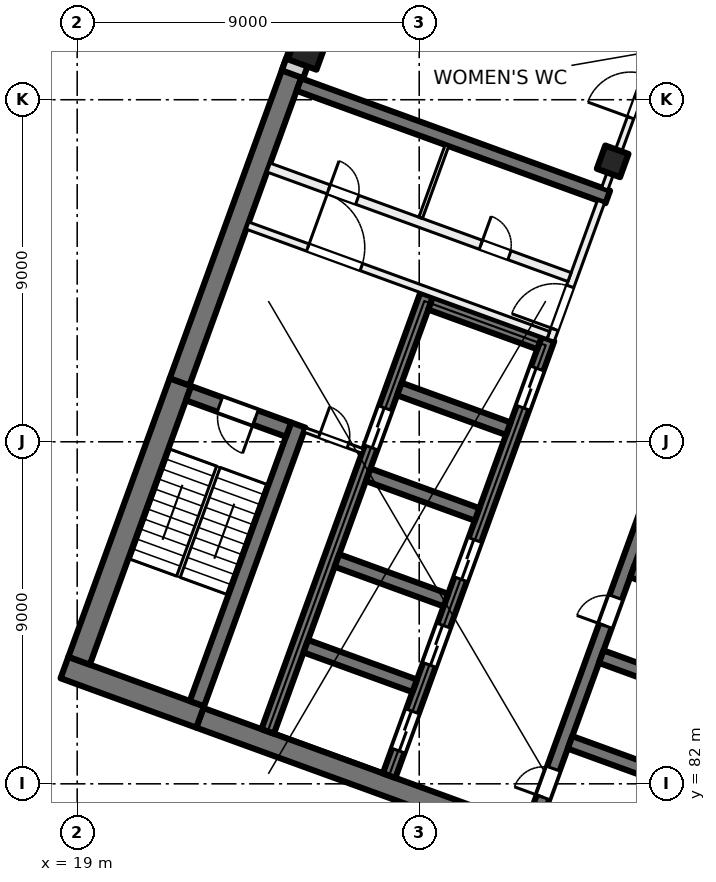
"""IFC4 building model, lengths in metres.
Left out: names, types, materials, properties, quantities, classifications, styles, units other than length and angle.
Written with IfcOpenShell. Run it as: python <this file> out.ifc"""

import sys

from ifc_helpers import new_model, si_unit, direction, frame, frame_2d, origin, origin_2d, place, context, subcontext, project, spatial, rectangle, extrude, element, fill, save


model = new_model("IFC4")
c1 = context("Model", 3, precision=1e-05, world=origin(), true_north=direction((0.0, 1.0)))
c2 = subcontext(c1, "Body", "Model", "MODEL_VIEW")
j1 = project(units=[si_unit("LENGTHUNIT", "METRE"), si_unit("PLANEANGLEUNIT", "RADIAN")], contexts=[c1])
p1 = place(None, origin())
s1 = spatial("IfcSite", under=j1, at=p1, CompositionType="ELEMENT")
p2 = place(p1, origin())
s2 = spatial("IfcBuilding", under=s1, at=p2, CompositionType="ELEMENT")
p3 = place(p2, frame((0.0, 0.0, 154.5)))
s3 = spatial("IfcBuildingStorey", under=s2, at=p3, CompositionType="ELEMENT", Elevation=154.5)
p4 = place(p3, frame((33.091, 98.379, 0.0), z_axis=(0.0, 0.0, 1.0), x_axis=(-0.342020143326, -0.939692620786, 0.0)))
e1 = element("IfcColumn", 1, at=p4, inside=s3, PredefinedType="COLUMN", context=c2, shape_type="SweptSolid", body=[
    extrude(rectangle(XDim=0.65, YDim=0.65, at=origin_2d()), origin(), (0.0, 0.0, 1.0), 4.0),
])
p5 = place(p3, frame((25.056, 101.303, 0.0), z_axis=(0.0, 0.0, 1.0), x_axis=(-0.342020143326, -0.939692620786, 0.0)))
e2 = element("IfcColumn", 2, at=p5, inside=s3, PredefinedType="COLUMN", context=c2, shape_type="SweptSolid", body=[
    extrude(rectangle(XDim=0.8, YDim=0.8, at=origin_2d()), origin(), (0.0, 0.0, 1.0), 4.0),
])
p6 = place(p3, frame((35.759, 78.811, 0.0), z_axis=(0.0, 0.0, 1.0), x_axis=(-0.939692894512, 0.342019391267, 0.0)))
e3 = element("IfcWall", 3, at=p6, inside=s3, PredefinedType="SHEAR", context=c2, shape_type="SweptSolid", body=[
    extrude(rectangle(XDim=14.4, YDim=0.55, at=frame_2d((7.2, 0.0))), origin(), (0.0, 0.0, 1.0), 4.0),
])
p7 = place(p3, frame((22.236, 83.76, 0.0), z_axis=(0.0, 0.0, 1.0), x_axis=(-0.939680822529, 0.342052557032, 0.0)))
e4 = element("IfcWall", 4, at=p7, inside=s3, PredefinedType="SHEAR", context=c2, shape_type="SweptSolid", body=[
    extrude(rectangle(XDim=3.8, YDim=0.6, at=frame_2d((1.9, 0.0))), origin(), (0.0, 0.0, 1.0), 4.0),
])
p8 = place(p3, frame((19.05, 85.239, 0.0), z_axis=(0.0, 0.0, 1.0), x_axis=(0.342016982193, 0.939693771338, 0.0)))
e5 = element("IfcWall", 5, at=p8, inside=s3, PredefinedType="SHEAR", context=c2, shape_type="SweptSolid", body=[
    extrude(rectangle(XDim=7.8, YDim=0.6, at=frame_2d((3.9, 0.0))), origin(), (0.0, 0.0, 1.0), 4.0),
])
p9 = place(p3, frame((21.694, 92.577, 0.0), z_axis=(0.0, 0.0, 1.0), x_axis=(0.342010253184, 0.939696220444, 0.0)))
e6 = element("IfcWall", 6, at=p9, inside=s3, PredefinedType="SHEAR", context=c2, shape_type="SweptSolid", body=[
    extrude(rectangle(XDim=8.95, YDim=0.55, at=frame_2d((4.475, 0.0))), origin(), (0.0, 0.0, 1.0), 4.0),
])
p10 = place(p3, frame((22.15, 84.11, 0.0), z_axis=(0.0, 0.0, 1.0), x_axis=(0.342016982193, 0.939693771338, 0.0)))
e7 = element("IfcWall", 7, at=p10, inside=s3, PredefinedType="SHEAR", context=c2, shape_type="SweptSolid", body=[
    extrude(rectangle(XDim=7.8, YDim=0.4, at=frame_2d((3.9, 0.0))), origin(), (0.0, 0.0, 1.0), 4.0),
])
p11 = place(p3, frame((24.562, 91.32, 0.0), z_axis=(0.0, 0.0, 1.0), x_axis=(-0.939717030584, 0.341953070509, 0.0)))
e8 = element("IfcWall", 8, at=p11, inside=s3, PredefinedType="SHEAR", context=c2, shape_type="SweptSolid", body=[
    extrude(rectangle(XDim=2.8, YDim=0.4, at=frame_2d((1.4, 0.0))), origin(), (0.0, 0.0, 1.0), 4.0),
])
p12 = place(p11, frame((0.925, 0.0, 0.0)))
e9 = element("IfcOpeningElement", 9, at=p12, cuts=e8, PredefinedType="OPENING", context=c2, shape_type="SweptSolid", body=[
    extrude(rectangle(XDim=1.0, YDim=2.1, at=frame_2d((0.5, 1.05))), frame((0.0, 0.21, 0.0), z_axis=(0.0, -1.0, 0.0), x_axis=(1.0, 0.0, 0.0)), (0.0, 0.0, 1.0), 0.42),
])
p13 = place(p3, frame((30.967, 80.848, 0.0), z_axis=(0.0, 0.0, 1.0), x_axis=(0.34201563943, 0.939694260058, 0.0)))
e10 = element("IfcWall", 10, at=p13, inside=s3, PredefinedType="SHEAR", context=c2, shape_type="SweptSolid", body=[
    extrude(rectangle(XDim=12.225, YDim=0.35, at=frame_2d((6.113, 0.0))), origin(), (0.0, 0.0, 1.0), 4.0),
])
p14 = place(p13, frame((0.85, 0.0, 0.0)))
e11 = element("IfcOpeningElement", 11, at=p14, cuts=e10, PredefinedType="OPENING", context=c2, shape_type="SweptSolid", body=[
    extrude(rectangle(XDim=0.8, YDim=2.1, at=frame_2d((0.4, 1.05))), frame((0.0, 0.185, 0.0), z_axis=(0.0, -1.0, 0.0), x_axis=(1.0, 0.0, 0.0)), (0.0, 0.0, 1.0), 0.37),
])
p15 = place(p13, frame((5.65, 0.0, 0.0)))
e12 = element("IfcOpeningElement", 12, at=p15, cuts=e10, PredefinedType="OPENING", context=c2, shape_type="SweptSolid", body=[
    extrude(rectangle(XDim=0.8, YDim=2.1, at=frame_2d((0.4, 1.05))), frame((0.0, 0.185, 0.0), z_axis=(0.0, -1.0, 0.0), x_axis=(1.0, 0.0, 0.0)), (0.0, 0.0, 1.0), 0.37),
])
p16 = place(p3, frame((34.835, 82.047, 0.0), z_axis=(0.0, 0.0, 1.0), x_axis=(-0.939683528043, 0.3420451244, 0.0)))
e13 = element("IfcWall", 13, at=p16, inside=s3, PredefinedType="SHEAR", context=c2, shape_type="SweptSolid", body=[
    extrude(rectangle(XDim=3.05, YDim=0.35, at=frame_2d((1.525, 0.0))), origin(), (0.0, 0.0, 1.0), 4.0),
])
p17 = place(p3, frame((35.656, 84.303, 0.0), z_axis=(0.0, 0.0, 1.0), x_axis=(-0.939709254651, 0.341974438698, 0.0)))
e14 = element("IfcWall", 14, at=p17, inside=s3, PredefinedType="SHEAR", context=c2, shape_type="SweptSolid", body=[
    extrude(rectangle(XDim=3.05, YDim=0.35, at=frame_2d((1.525, 0.0))), origin(), (0.0, 0.0, 1.0), 4.0),
])
p18 = place(p3, frame((36.477, 86.558, 0.0), z_axis=(0.0, 0.0, 1.0), x_axis=(-0.939683528043, 0.3420451244, 0.0)))
e15 = element("IfcWall", 15, at=p18, inside=s3, PredefinedType="SHEAR", context=c2, shape_type="SweptSolid", body=[
    extrude(rectangle(XDim=3.05, YDim=0.35, at=frame_2d((1.525, 0.0))), origin(), (0.0, 0.0, 1.0), 4.0),
])
p19 = place(p3, frame((27.208, 82.216, 0.0), z_axis=(0.0, 0.0, 1.0), x_axis=(0.34201563943, 0.939694260058, 0.0)))
e16 = element("IfcWall", 16, at=p19, inside=s3, PredefinedType="SHEAR", context=c2, shape_type="SweptSolid", body=[
    extrude(rectangle(XDim=12.225, YDim=0.35, at=frame_2d((6.113, 0.0))), origin(), (0.0, 0.0, 1.0), 4.0),
])
p20 = place(p19, frame((0.7, 0.0, 0.0)))
e17 = element("IfcOpeningElement", 17, at=p20, cuts=e16, PredefinedType="OPENING", context=c2, shape_type="SweptSolid", body=[
    extrude(rectangle(XDim=1.1, YDim=2.1, at=frame_2d((0.55, 1.05))), frame((0.0, 0.185, 0.0), z_axis=(0.0, -1.0, 0.0), x_axis=(1.0, 0.0, 0.0)), (0.0, 0.0, 1.0), 0.37),
])
p21 = place(p19, frame((3.1, 0.0, 0.0)))
e18 = element("IfcOpeningElement", 18, at=p21, cuts=e16, PredefinedType="OPENING", context=c2, shape_type="SweptSolid", body=[
    extrude(rectangle(XDim=1.1, YDim=2.1, at=frame_2d((0.55, 1.05))), frame((0.0, 0.185, 0.0), z_axis=(0.0, -1.0, 0.0), x_axis=(1.0, 0.0, 0.0)), (0.0, 0.0, 1.0), 0.37),
])
p22 = place(p19, frame((5.5, 0.0, 0.0)))
e19 = element("IfcOpeningElement", 19, at=p22, cuts=e16, PredefinedType="OPENING", context=c2, shape_type="SweptSolid", body=[
    extrude(rectangle(XDim=1.1, YDim=2.1, at=frame_2d((0.55, 1.05))), frame((0.0, 0.185, 0.0), z_axis=(0.0, -1.0, 0.0), x_axis=(1.0, 0.0, 0.0)), (0.0, 0.0, 1.0), 0.37),
])
p23 = place(p19, frame((10.3, 0.0, 0.0)))
e20 = element("IfcOpeningElement", 20, at=p23, cuts=e16, PredefinedType="OPENING", context=c2, shape_type="SweptSolid", body=[
    extrude(rectangle(XDim=1.1, YDim=2.1, at=frame_2d((0.55, 1.05))), frame((0.0, 0.185, 0.0), z_axis=(0.0, -1.0, 0.0), x_axis=(1.0, 0.0, 0.0)), (0.0, 0.0, 1.0), 0.37),
])
p24 = place(p3, frame((24.013, 83.379, 0.0), z_axis=(0.0, 0.0, 1.0), x_axis=(0.34201563943, 0.939694260058, 0.0)))
e21 = element("IfcWall", 21, at=p24, inside=s3, PredefinedType="SHEAR", context=c2, shape_type="SweptSolid", body=[
    extrude(rectangle(XDim=12.225, YDim=0.35, at=frame_2d((6.113, 0.0))), origin(), (0.0, 0.0, 1.0), 4.0),
])
p25 = place(p24, frame((7.95, 0.0, 0.0)))
e22 = element("IfcOpeningElement", 22, at=p25, cuts=e21, PredefinedType="OPENING", context=c2, shape_type="SweptSolid", body=[
    extrude(rectangle(XDim=1.1, YDim=2.1, at=frame_2d((0.55, 1.05))), frame((0.0, 0.185, 0.0), z_axis=(0.0, -1.0, 0.0), x_axis=(1.0, 0.0, 0.0)), (0.0, 0.0, 1.0), 0.37),
])
for number, where, z_axis, x_axis in (
    (23, (27.881, 84.578, 0.0), (0.0, 0.0, 1.0), (-0.94, 0.342, 0.0)),
    (24, (28.702, 86.833, 0.0), (0.0, 0.0, 1.0), (-0.94, 0.342, 0.0)),
    (25, (29.523, 89.089, 0.0), (0.0, 0.0, 1.0), (-0.94, 0.342, 0.0)),
):
    element("IfcWall", number, at=place(p3, frame(where, z_axis=z_axis, x_axis=x_axis)), inside=s3, PredefinedType="SHEAR", context=c2, shape_type="SweptSolid", body=[
        extrude(rectangle(XDim=3.05, YDim=0.35, at=frame_2d((1.525, 0.0))), origin(), (0.0, 0.0, 1.0), 4.0),
    ])
p26 = place(p3, frame((30.344, 91.344, 0.0), z_axis=(0.0, 0.0, 1.0), x_axis=(-0.939709254651, 0.341974438698, 0.0)))
e26 = element("IfcWall", 26, at=p26, inside=s3, PredefinedType="SHEAR", context=c2, shape_type="SweptSolid", body=[
    extrude(rectangle(XDim=3.05, YDim=0.35, at=frame_2d((1.525, 0.0))), origin(), (0.0, 0.0, 1.0), 4.0),
])
p27 = place(p3, frame((31.165, 93.599, 0.0), z_axis=(0.0, 0.0, 1.0), x_axis=(-0.939683528043, 0.3420451244, 0.0)))
e27 = element("IfcWall", 27, at=p27, inside=s3, PredefinedType="SHEAR", context=c2, shape_type="SweptSolid", body=[
    extrude(rectangle(XDim=3.05, YDim=0.35, at=frame_2d((1.525, 0.0))), origin(), (0.0, 0.0, 1.0), 4.0),
])
p28 = place(p3, frame((32.962, 97.441, 0.0), z_axis=(0.0, 0.0, 1.0), x_axis=(-0.939689545667, 0.342028592028, 0.0)))
e28 = element("IfcWall", 28, at=p28, inside=s3, PredefinedType="SHEAR", context=c2, shape_type="SweptSolid", body=[
    extrude(rectangle(XDim=8.65, YDim=0.35, at=frame_2d((4.325, 0.0))), origin(), (0.0, 0.0, 1.0), 4.0),
])
p29 = place(p3, frame((24.666, 100.669, 0.0), z_axis=(0.0, 0.0, 1.0), x_axis=(0.34201964167, 0.939692803373, 0.0)))
e29 = element("IfcWall", 29, at=p29, inside=s3, PredefinedType="SOLIDWALL", context=c2, shape_type="SweptSolid", body=[
    extrude(rectangle(XDim=32.884, YDim=0.6, at=frame_2d((16.442, 0.0))), origin(), (0.0, 0.0, 1.0), 3.625),
])
p30 = place(p29, frame((1.48, 0.0, 0.9)))
e30 = element("IfcOpeningElement", 30, at=p30, cuts=e29, PredefinedType="OPENING", context=c2, shape_type="SweptSolid", body=[
    extrude(rectangle(XDim=3.0, YDim=2.4, at=frame_2d((1.5, 1.2))), frame((0.0, 0.31, 0.0), z_axis=(0.0, -1.0, 0.0), x_axis=(1.0, 0.0, 0.0)), (0.0, 0.0, 1.0), 0.62),
])
p31 = place(p29, frame((5.98, 0.0, 0.9)))
e31 = element("IfcOpeningElement", 31, at=p31, cuts=e29, PredefinedType="OPENING", context=c2, shape_type="SweptSolid", body=[
    extrude(rectangle(XDim=3.0, YDim=2.4, at=frame_2d((1.5, 1.2))), frame((0.0, 0.31, 0.0), z_axis=(0.0, -1.0, 0.0), x_axis=(1.0, 0.0, 0.0)), (0.0, 0.0, 1.0), 0.62),
])
p32 = place(p29, frame((10.48, 0.0, 0.9)))
e32 = element("IfcOpeningElement", 32, at=p32, cuts=e29, PredefinedType="OPENING", context=c2, shape_type="SweptSolid", body=[
    extrude(rectangle(XDim=3.0, YDim=2.4, at=frame_2d((1.5, 1.2))), frame((0.0, 0.31, 0.0), z_axis=(0.0, -1.0, 0.0), x_axis=(1.0, 0.0, 0.0)), (0.0, 0.0, 1.0), 0.62),
])
p33 = place(p29, frame((14.98, 0.0, 0.9)))
e33 = element("IfcOpeningElement", 33, at=p33, cuts=e29, PredefinedType="OPENING", context=c2, shape_type="SweptSolid", body=[
    extrude(rectangle(XDim=3.0, YDim=2.4, at=frame_2d((1.5, 1.2))), frame((0.0, 0.31, 0.0), z_axis=(0.0, -1.0, 0.0), x_axis=(1.0, 0.0, 0.0)), (0.0, 0.0, 1.0), 0.62),
])
p34 = place(p29, frame((20.08, 0.0, 0.0)))
e34 = element("IfcOpeningElement", 34, at=p34, cuts=e29, PredefinedType="OPENING", context=c2, shape_type="SweptSolid", body=[
    extrude(rectangle(XDim=1.8, YDim=2.4, at=frame_2d((0.9, 1.2))), frame((0.0, 0.31, 0.0), z_axis=(0.0, -1.0, 0.0), x_axis=(1.0, 0.0, 0.0)), (0.0, 0.0, 1.0), 0.62),
])
p35 = place(p29, frame((23.98, 0.0, 0.9)))
e35 = element("IfcOpeningElement", 35, at=p35, cuts=e29, PredefinedType="OPENING", context=c2, shape_type="SweptSolid", body=[
    extrude(rectangle(XDim=3.0, YDim=2.4, at=frame_2d((1.5, 1.2))), frame((0.0, 0.31, 0.0), z_axis=(0.0, -1.0, 0.0), x_axis=(1.0, 0.0, 0.0)), (0.0, 0.0, 1.0), 0.62),
])
p36 = place(p29, frame((28.48, 0.0, 0.9)))
e36 = element("IfcOpeningElement", 36, at=p36, cuts=e29, PredefinedType="OPENING", context=c2, shape_type="SweptSolid", body=[
    extrude(rectangle(XDim=3.0, YDim=2.4, at=frame_2d((1.5, 1.2))), frame((0.0, 0.31, 0.0), z_axis=(0.0, -1.0, 0.0), x_axis=(1.0, 0.0, 0.0)), (0.0, 0.0, 1.0), 0.62),
])
p37 = place(p3, frame((31.459, 93.678, 0.0), z_axis=(0.0, 0.0, 1.0), x_axis=(0.341985870128, 0.939705094502, 0.0)))
e37 = element("IfcWall", 37, at=p37, inside=s3, PredefinedType="PARTITIONING", context=c2, shape_type="SweptSolid", body=[
    extrude(rectangle(XDim=3.875, YDim=0.2, at=frame_2d((1.938, 0.0))), origin(), (0.0, 0.0, 1.0), 3.625),
])
p38 = place(p37, frame((0.3, 0.0, 0.0)))
e38 = element("IfcOpeningElement", 38, at=p38, cuts=e37, PredefinedType="OPENING", context=c2, shape_type="SweptSolid", body=[
    extrude(rectangle(XDim=1.2, YDim=2.1, at=frame_2d((0.6, 1.05))), frame((0.0, 0.11, 0.0), z_axis=(0.0, -1.0, 0.0), x_axis=(1.0, 0.0, 0.0)), (0.0, 0.0, 1.0), 0.22),
])
p39 = place(p3, frame((23.483, 96.688, 0.0), z_axis=(0.0, 0.0, 1.0), x_axis=(0.939691007314, -0.342024576271, 0.0)))
e39 = element("IfcWall", 39, at=p39, inside=s3, PredefinedType="PARTITIONING", context=c2, shape_type="SweptSolid", body=[
    extrude(rectangle(XDim=8.425, YDim=0.2, at=frame_2d((4.212, 0.0))), origin(), (0.0, 0.0, 1.0), 3.625),
])
p40 = place(p39, frame((1.688, 0.0, 0.0)))
e40 = element("IfcOpeningElement", 40, at=p40, cuts=e39, PredefinedType="OPENING", context=c2, shape_type="SweptSolid", body=[
    extrude(rectangle(XDim=1.5, YDim=2.1, at=frame_2d((0.75, 1.05))), frame((0.0, 0.11, 0.0), z_axis=(0.0, -1.0, 0.0), x_axis=(1.0, 0.0, 0.0)), (0.0, 0.0, 1.0), 0.22),
])
p41 = place(p3, frame((24.039, 98.215, 0.0), z_axis=(0.0, 0.0, 1.0), x_axis=(0.939687617333, -0.342033889887, 0.0)))
e41 = element("IfcWall", 41, at=p41, inside=s3, PredefinedType="PARTITIONING", context=c2, shape_type="SweptSolid", body=[
    extrude(rectangle(XDim=8.425, YDim=0.25, at=frame_2d((4.212, 0.0))), origin(), (0.0, 0.0, 1.0), 3.625),
])
p42 = place(p41, frame((5.942, 0.0, 0.0)))
e42 = element("IfcOpeningElement", 42, at=p42, cuts=e41, PredefinedType="OPENING", context=c2, shape_type="SweptSolid", body=[
    extrude(rectangle(XDim=0.8, YDim=2.1, at=frame_2d((0.4, 1.05))), frame((0.0, 0.135, 0.0), z_axis=(0.0, -1.0, 0.0), x_axis=(1.0, 0.0, 0.0)), (0.0, 0.0, 1.0), 0.27),
])
p43 = place(p41, frame((1.68, 0.0, 0.0)))
e43 = element("IfcOpeningElement", 43, at=p43, cuts=e41, PredefinedType="OPENING", context=c2, shape_type="SweptSolid", body=[
    extrude(rectangle(XDim=0.8, YDim=2.1, at=frame_2d((0.4, 1.05))), frame((0.0, 0.135, 0.0), z_axis=(0.0, -1.0, 0.0), x_axis=(1.0, 0.0, 0.0)), (0.0, 0.0, 1.0), 0.27),
])
p44 = place(p3, frame((24.985, 91.312, 0.0), z_axis=(0.0, 0.0, 1.0), x_axis=(0.939705651352, -0.341984340019, 0.0)))
e44 = element("IfcWall", 44, at=p44, inside=s3, PredefinedType="PARTITIONING", context=c2, shape_type="SweptSolid", body=[
    extrude(rectangle(XDim=1.625, YDim=0.125, at=frame_2d((0.812, 0.0))), origin(), (0.0, 0.0, 1.0), 3.625),
])
p45 = place(p44, frame((0.413, 0.0, 0.0)))
e45 = element("IfcOpeningElement", 45, at=p45, cuts=e44, PredefinedType="OPENING", context=c2, shape_type="SweptSolid", body=[
    extrude(rectangle(XDim=0.8, YDim=2.1, at=frame_2d((0.4, 1.05))), frame((0.0, 0.073, 0.0), z_axis=(0.0, -1.0, 0.0), x_axis=(1.0, 0.0, 0.0)), (0.0, 0.0, 1.0), 0.145),
])
p46 = place(p3, frame((28.037, 96.893, 0.0), z_axis=(0.0, 0.0, 1.0), x_axis=(0.342043138314, 0.939684250976, 0.0)))
e46 = element("IfcWall", 46, at=p46, inside=s3, PredefinedType="PARTITIONING", context=c2, shape_type="SweptSolid", body=[
    extrude(rectangle(XDim=2.025, YDim=0.1, at=frame_2d((1.012, 0.0))), origin(), (0.0, 0.0, 1.0), 3.625),
])
p47 = place(p3, frame((26.736, 105.48, 0.0), z_axis=(0.0, 0.0, 1.0), x_axis=(0.939721611154, -0.341940482438, 0.0)))
e47 = element("IfcWall", 47, at=p47, inside=s3, PredefinedType="PARTITIONING", context=c2, shape_type="SweptSolid", body=[
    extrude(rectangle(XDim=12.312, YDim=0.175, at=frame_2d((6.156, 0.0))), origin(), (0.0, 0.0, 1.0), 3.625),
])
p48 = place(p3, frame((32.881, 97.657, 0.0), z_axis=(0.0, 0.0, 1.0), x_axis=(0.342058204353, 0.939678766832, 0.0)))
e48 = element("IfcWall", 48, at=p48, inside=s3, PredefinedType="PARTITIONING", context=c2, shape_type="SweptSolid", body=[
    extrude(rectangle(XDim=5.163, YDim=0.175, at=frame_2d((2.581, 0.0))), origin(), (0.0, 0.0, 1.0), 3.625),
])
p49 = place(p48, frame((1.991, 0.0, 0.0)))
e49 = element("IfcOpeningElement", 49, at=p49, cuts=e48, PredefinedType="OPENING", context=c2, shape_type="SweptSolid", body=[
    extrude(rectangle(XDim=1.2, YDim=2.1, at=frame_2d((0.6, 1.05))), frame((0.0, 0.097, 0.0), z_axis=(0.0, -1.0, 0.0), x_axis=(1.0, 0.0, 0.0)), (0.0, 0.0, 1.0), 0.195),
])
p50 = place(p20, origin())
e50 = element("IfcDoor", 50, at=p50, inside=s3, OperationType="DOUBLE_DOOR_SLIDING", PredefinedType="DOOR", context=c2, shape_type="SweptSolid", body=[
    extrude(rectangle(XDim=1.1, YDim=2.1, at=frame_2d((0.55, 1.05))), frame((0.0, 0.025, 0.0), z_axis=(0.0, -1.0, 0.0), x_axis=(1.0, 0.0, 0.0)), (0.0, 0.0, 1.0), 0.05),
])
fill(e17, e50)
p51 = place(p21, origin())
e51 = element("IfcDoor", 51, at=p51, inside=s3, OperationType="DOUBLE_DOOR_SLIDING", PredefinedType="DOOR", context=c2, shape_type="SweptSolid", body=[
    extrude(rectangle(XDim=1.1, YDim=2.1, at=frame_2d((0.55, 1.05))), frame((0.0, 0.025, 0.0), z_axis=(0.0, -1.0, 0.0), x_axis=(1.0, 0.0, 0.0)), (0.0, 0.0, 1.0), 0.05),
])
fill(e18, e51)
p52 = place(p22, origin())
e52 = element("IfcDoor", 52, at=p52, inside=s3, OperationType="DOUBLE_DOOR_SLIDING", PredefinedType="DOOR", context=c2, shape_type="SweptSolid", body=[
    extrude(rectangle(XDim=1.1, YDim=2.1, at=frame_2d((0.55, 1.05))), frame((0.0, 0.025, 0.0), z_axis=(0.0, -1.0, 0.0), x_axis=(1.0, 0.0, 0.0)), (0.0, 0.0, 1.0), 0.05),
])
fill(e19, e52)
p53 = place(p23, origin())
e53 = element("IfcDoor", 53, at=p53, inside=s3, OperationType="DOUBLE_DOOR_SLIDING", PredefinedType="DOOR", context=c2, shape_type="SweptSolid", body=[
    extrude(rectangle(XDim=1.1, YDim=2.1, at=frame_2d((0.55, 1.05))), frame((0.0, 0.025, 0.0), z_axis=(0.0, -1.0, 0.0), x_axis=(1.0, 0.0, 0.0)), (0.0, 0.0, 1.0), 0.05),
])
fill(e20, e53)
p54 = place(p14, origin())
e54 = element("IfcDoor", 54, at=p54, inside=s3, OperationType="SINGLE_SWING_LEFT", PredefinedType="DOOR", context=c2, shape_type="SweptSolid", body=[
    extrude(rectangle(XDim=0.8, YDim=2.1, at=frame_2d((0.4, 1.05))), frame((0.0, 0.025, 0.0), z_axis=(0.0, -1.0, 0.0), x_axis=(1.0, 0.0, 0.0)), (0.0, 0.0, 1.0), 0.05),
])
fill(e11, e54)
p55 = place(p15, origin())
e55 = element("IfcDoor", 55, at=p55, inside=s3, OperationType="SINGLE_SWING_RIGHT", PredefinedType="DOOR", context=c2, shape_type="SweptSolid", body=[
    extrude(rectangle(XDim=0.8, YDim=2.1, at=frame_2d((0.4, 1.05))), frame((0.0, 0.025, 0.0), z_axis=(0.0, -1.0, 0.0), x_axis=(1.0, 0.0, 0.0)), (0.0, 0.0, 1.0), 0.05),
])
fill(e12, e55)
p56 = place(p38, origin())
e56 = element("IfcDoor", 56, at=p56, inside=s3, OperationType="DOUBLE_DOOR_SINGLE_SWING", PredefinedType="DOOR", context=c2, shape_type="SweptSolid", body=[
    extrude(rectangle(XDim=1.2, YDim=2.1, at=frame_2d((0.6, 1.05))), frame((0.0, 0.025, 0.0), z_axis=(0.0, -1.0, 0.0), x_axis=(1.0, 0.0, 0.0)), (0.0, 0.0, 1.0), 0.05),
])
fill(e38, e56)
p57 = place(p40, origin())
e57 = element("IfcDoor", 57, at=p57, inside=s3, OperationType="DOUBLE_DOOR_SINGLE_SWING", PredefinedType="DOOR", context=c2, shape_type="SweptSolid", body=[
    extrude(rectangle(XDim=1.5, YDim=2.1, at=frame_2d((0.75, 1.05))), frame((0.0, 0.025, 0.0), z_axis=(0.0, -1.0, 0.0), x_axis=(1.0, 0.0, 0.0)), (0.0, 0.0, 1.0), 0.05),
])
fill(e40, e57)
p58 = place(p12, origin())
e58 = element("IfcDoor", 58, at=p58, inside=s3, OperationType="SINGLE_SWING_LEFT", PredefinedType="DOOR", context=c2, shape_type="SweptSolid", body=[
    extrude(rectangle(XDim=1.0, YDim=2.1, at=frame_2d((0.5, 1.05))), frame((0.0, 0.025, 0.0), z_axis=(0.0, -1.0, 0.0), x_axis=(1.0, 0.0, 0.0)), (0.0, 0.0, 1.0), 0.05),
])
fill(e9, e58)
p59 = place(p45, origin())
e59 = element("IfcDoor", 59, at=p59, inside=s3, OperationType="SINGLE_SWING_RIGHT", PredefinedType="DOOR", context=c2, shape_type="SweptSolid", body=[
    extrude(rectangle(XDim=0.8, YDim=2.1, at=frame_2d((0.4, 1.05))), frame((0.0, 0.025, 0.0), z_axis=(0.0, -1.0, 0.0), x_axis=(1.0, 0.0, 0.0)), (0.0, 0.0, 1.0), 0.05),
])
fill(e45, e59)
p60 = place(p42, origin())
e60 = element("IfcDoor", 60, at=p60, inside=s3, OperationType="SINGLE_SWING_LEFT", PredefinedType="DOOR", context=c2, shape_type="SweptSolid", body=[
    extrude(rectangle(XDim=0.8, YDim=2.1, at=frame_2d((0.4, 1.05))), frame((0.0, 0.025, 0.0), z_axis=(0.0, -1.0, 0.0), x_axis=(1.0, 0.0, 0.0)), (0.0, 0.0, 1.0), 0.05),
])
fill(e42, e60)
p61 = place(p43, origin())
e61 = element("IfcDoor", 61, at=p61, inside=s3, OperationType="SINGLE_SWING_RIGHT", PredefinedType="DOOR", context=c2, shape_type="SweptSolid", body=[
    extrude(rectangle(XDim=0.8, YDim=2.1, at=frame_2d((0.4, 1.05))), frame((0.0, 0.025, 0.0), z_axis=(0.0, -1.0, 0.0), x_axis=(1.0, 0.0, 0.0)), (0.0, 0.0, 1.0), 0.05),
])
fill(e43, e61)
p62 = place(p25, origin())
e62 = element("IfcDoor", 62, at=p62, inside=s3, OperationType="DOUBLE_DOOR_SLIDING", PredefinedType="DOOR", context=c2, shape_type="SweptSolid", body=[
    extrude(rectangle(XDim=1.1, YDim=2.1, at=frame_2d((0.55, 1.05))), frame((0.0, 0.025, 0.0), z_axis=(0.0, -1.0, 0.0), x_axis=(1.0, 0.0, 0.0)), (0.0, 0.0, 1.0), 0.05),
])
fill(e22, e62)
p63 = place(p49, origin())
e63 = element("IfcDoor", 63, at=p63, inside=s3, OperationType="DOUBLE_DOOR_SINGLE_SWING", PredefinedType="DOOR", context=c2, shape_type="SweptSolid", body=[
    extrude(rectangle(XDim=1.2, YDim=2.1, at=frame_2d((0.6, 1.05))), frame((0.0, 0.025, 0.0), z_axis=(0.0, -1.0, 0.0), x_axis=(1.0, 0.0, 0.0)), (0.0, 0.0, 1.0), 0.05),
])
fill(e49, e63)
save(model, sys.argv[1])
